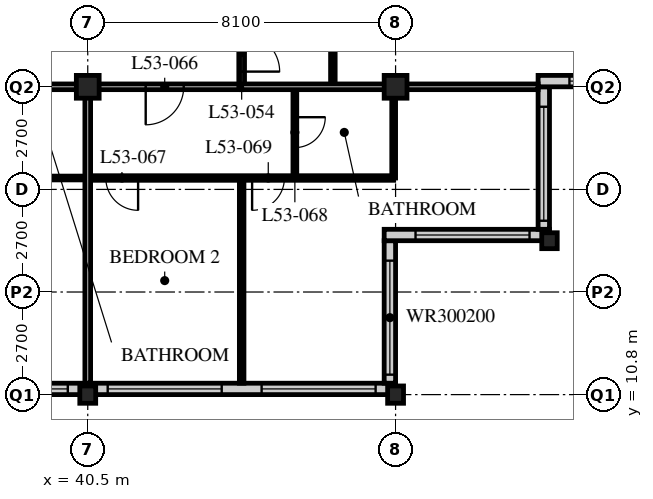
"""IFC4 building model, lengths in metres.
Left out: names, types, materials, properties, quantities, classifications, styles, units other than length and angle.
Written with IfcOpenShell. Run it as: python <this file> out.ifc"""

import sys

from ifc_helpers import new_model, si_unit, direction, frame, frame_2d, origin, origin_2d, place, context, subcontext, project, spatial, rectangle, hollow_rectangle, i_section, extrude, element, fill, save


model = new_model("IFC4")
c1 = context("Model", 3, precision=1e-05, world=origin(), true_north=direction((0.0, 1.0)))
c2 = subcontext(c1, "Body", "Model", "MODEL_VIEW")
j1 = project(units=[si_unit("LENGTHUNIT", "METRE"), si_unit("PLANEANGLEUNIT", "RADIAN")], contexts=[c1])
p1 = place(None, origin())
s1 = spatial("IfcSite", under=j1, at=p1, CompositionType="ELEMENT")
p2 = place(p1, origin())
s2 = spatial("IfcBuilding", under=s1, at=p2, CompositionType="ELEMENT")
p3 = place(p2, frame((0.0, 0.0, 206.4)))
s3 = spatial("IfcBuildingStorey", under=s2, at=p3, CompositionType="ELEMENT", Elevation=206.4)
p4 = place(p3, frame((40.5, 10.8, 0.0), z_axis=(0.0, 0.0, 1.0), x_axis=(1.0, 0.0, 0.0)))
e1 = element("IfcColumn", 1, at=p4, inside=s3, PredefinedType="COLUMN", context=c2, shape_type="SweptSolid", body=[
    extrude(i_section(OverallWidth=0.418, OverallDepth=0.456, WebThickness=0.042, FlangeThickness=0.067, FilletRadius=0.015, at=origin_2d()), origin(), (0.0, 0.0, 1.0), 3.6),
])
p5 = place(p3, frame((40.5, 18.9, 0.0), z_axis=(0.0, 0.0, 1.0), x_axis=(1.0, 0.0, 0.0)))
e2 = element("IfcColumn", 2, at=p5, inside=s3, PredefinedType="COLUMN", context=c2, shape_type="SweptSolid", body=[
    extrude(hollow_rectangle(XDim=0.6, YDim=0.6, WallThickness=0.05, at=origin_2d()), origin(), (0.0, 0.0, 1.0), 3.6),
])
p6 = place(p3, frame((48.6, 10.8, 0.0), z_axis=(0.0, 0.0, 1.0), x_axis=(1.0, 0.0, 0.0)))
e3 = element("IfcColumn", 3, at=p6, inside=s3, PredefinedType="COLUMN", context=c2, shape_type="SweptSolid", body=[
    extrude(i_section(OverallWidth=0.418, OverallDepth=0.456, WebThickness=0.042, FlangeThickness=0.067, FilletRadius=0.015, at=origin_2d()), origin(), (0.0, 0.0, 1.0), 3.6),
])
p7 = place(p3, frame((48.6, 18.9, 0.0), z_axis=(0.0, 0.0, 1.0), x_axis=(1.0, 0.0, 0.0)))
e4 = element("IfcColumn", 4, at=p7, inside=s3, PredefinedType="COLUMN", context=c2, shape_type="SweptSolid", body=[
    extrude(hollow_rectangle(XDim=0.6, YDim=0.6, WallThickness=0.05, at=origin_2d()), origin(), (0.0, 0.0, 1.0), 3.6),
])
p8 = place(p3, frame((52.65, 14.85, 0.0), z_axis=(0.0, 0.0, 1.0), x_axis=(1.0, 0.0, 0.0)))
e5 = element("IfcColumn", 5, at=p8, inside=s3, PredefinedType="COLUMN", context=c2, shape_type="SweptSolid", body=[
    extrude(i_section(OverallWidth=0.407, OverallDepth=0.419, WebThickness=0.031, FlangeThickness=0.049, FilletRadius=0.015, at=origin_2d()), origin(), (0.0, 0.0, 1.0), 3.6),
])
p9 = place(p3, frame((8.4, 10.95, 0.0), z_axis=(0.0, 0.0, 1.0), x_axis=(1.0, 0.0, 0.0)))
e6 = element("IfcWall", 6, at=p9, inside=s3, PredefinedType="SOLIDWALL", context=c2, shape_type="SweptSolid", body=[
    extrude(rectangle(XDim=40.2, YDim=0.3, at=frame_2d((20.1, 0.0))), origin(), (0.0, 0.0, 1.0), 3.39),
])
p10 = place(p9, frame((0.225, 0.0, 0.6)))
e7 = element("IfcOpeningElement", 7, at=p10, cuts=e6, PredefinedType="OPENING", context=c2, shape_type="SweptSolid", body=[
    extrude(rectangle(XDim=3.0, YDim=2.4, at=frame_2d((1.5, 1.2))), frame((0.0, 0.16, 0.0), z_axis=(0.0, -1.0, 0.0), x_axis=(1.0, 0.0, 0.0)), (0.0, 0.0, 1.0), 0.32),
])
p11 = place(p9, frame((4.275, 0.0, 0.6)))
e8 = element("IfcOpeningElement", 8, at=p11, cuts=e6, PredefinedType="OPENING", context=c2, shape_type="SweptSolid", body=[
    extrude(rectangle(XDim=3.0, YDim=2.4, at=frame_2d((1.5, 1.2))), frame((0.0, 0.16, 0.0), z_axis=(0.0, -1.0, 0.0), x_axis=(1.0, 0.0, 0.0)), (0.0, 0.0, 1.0), 0.32),
])
p12 = place(p9, frame((8.325, 0.0, 0.6)))
e9 = element("IfcOpeningElement", 9, at=p12, cuts=e6, PredefinedType="OPENING", context=c2, shape_type="SweptSolid", body=[
    extrude(rectangle(XDim=3.0, YDim=2.4, at=frame_2d((1.5, 1.2))), frame((0.0, 0.16, 0.0), z_axis=(0.0, -1.0, 0.0), x_axis=(1.0, 0.0, 0.0)), (0.0, 0.0, 1.0), 0.32),
])
p13 = place(p9, frame((12.375, 0.0, 0.6)))
e10 = element("IfcOpeningElement", 10, at=p13, cuts=e6, PredefinedType="OPENING", context=c2, shape_type="SweptSolid", body=[
    extrude(rectangle(XDim=3.0, YDim=2.4, at=frame_2d((1.5, 1.2))), frame((0.0, 0.16, 0.0), z_axis=(0.0, -1.0, 0.0), x_axis=(1.0, 0.0, 0.0)), (0.0, 0.0, 1.0), 0.32),
])
p14 = place(p9, frame((16.425, 0.0, 0.6)))
e11 = element("IfcOpeningElement", 11, at=p14, cuts=e6, PredefinedType="OPENING", context=c2, shape_type="SweptSolid", body=[
    extrude(rectangle(XDim=3.0, YDim=2.4, at=frame_2d((1.5, 1.2))), frame((0.0, 0.16, 0.0), z_axis=(0.0, -1.0, 0.0), x_axis=(1.0, 0.0, 0.0)), (0.0, 0.0, 1.0), 0.32),
])
p15 = place(p9, frame((20.475, 0.0, 0.6)))
e12 = element("IfcOpeningElement", 12, at=p15, cuts=e6, PredefinedType="OPENING", context=c2, shape_type="SweptSolid", body=[
    extrude(rectangle(XDim=3.0, YDim=2.4, at=frame_2d((1.5, 1.2))), frame((0.0, 0.16, 0.0), z_axis=(0.0, -1.0, 0.0), x_axis=(1.0, 0.0, 0.0)), (0.0, 0.0, 1.0), 0.32),
])
p16 = place(p9, frame((24.525, 0.0, 0.6)))
e13 = element("IfcOpeningElement", 13, at=p16, cuts=e6, PredefinedType="OPENING", context=c2, shape_type="SweptSolid", body=[
    extrude(rectangle(XDim=3.0, YDim=2.4, at=frame_2d((1.5, 1.2))), frame((0.0, 0.16, 0.0), z_axis=(0.0, -1.0, 0.0), x_axis=(1.0, 0.0, 0.0)), (0.0, 0.0, 1.0), 0.32),
])
p17 = place(p9, frame((28.575, 0.0, 0.6)))
e14 = element("IfcOpeningElement", 14, at=p17, cuts=e6, PredefinedType="OPENING", context=c2, shape_type="SweptSolid", body=[
    extrude(rectangle(XDim=3.0, YDim=2.4, at=frame_2d((1.5, 1.2))), frame((0.0, 0.16, 0.0), z_axis=(0.0, -1.0, 0.0), x_axis=(1.0, 0.0, 0.0)), (0.0, 0.0, 1.0), 0.32),
])
p18 = place(p9, frame((32.625, 0.0, 0.6)))
e15 = element("IfcOpeningElement", 15, at=p18, cuts=e6, PredefinedType="OPENING", context=c2, shape_type="SweptSolid", body=[
    extrude(rectangle(XDim=3.0, YDim=2.4, at=frame_2d((1.5, 1.2))), frame((0.0, 0.16, 0.0), z_axis=(0.0, -1.0, 0.0), x_axis=(1.0, 0.0, 0.0)), (0.0, 0.0, 1.0), 0.32),
])
p19 = place(p9, frame((36.675, 0.0, 0.6)))
e16 = element("IfcOpeningElement", 16, at=p19, cuts=e6, PredefinedType="OPENING", context=c2, shape_type="SweptSolid", body=[
    extrude(rectangle(XDim=3.0, YDim=2.4, at=frame_2d((1.5, 1.2))), frame((0.0, 0.16, 0.0), z_axis=(0.0, -1.0, 0.0), x_axis=(1.0, 0.0, 0.0)), (0.0, 0.0, 1.0), 0.32),
])
p20 = place(p3, frame((48.45, 11.1, 0.0), z_axis=(0.0, 0.0, 1.0), x_axis=(0.0, 1.0, 0.0)))
e17 = element("IfcWall", 17, at=p20, inside=s3, PredefinedType="SOLIDWALL", context=c2, shape_type="SweptSolid", body=[
    extrude(rectangle(XDim=3.75, YDim=0.3, at=frame_2d((1.875, 0.0))), origin(), (0.0, 0.0, 1.0), 3.39),
])
p21 = place(p20, frame((0.225, 0.0, 0.6)))
e18 = element("IfcOpeningElement", 18, at=p21, cuts=e17, PredefinedType="OPENING", context=c2, shape_type="SweptSolid", body=[
    extrude(rectangle(XDim=3.0, YDim=2.0, at=frame_2d((1.5, 1.0))), frame((0.0, 0.16, 0.0), z_axis=(0.0, -1.0, 0.0), x_axis=(1.0, 0.0, 0.0)), (0.0, 0.0, 1.0), 0.32),
])
p22 = place(p3, frame((48.3, 15.0, 0.0), z_axis=(0.0, 0.0, 1.0), x_axis=(1.0, 0.0, 0.0)))
e19 = element("IfcWall", 19, at=p22, inside=s3, PredefinedType="SOLIDWALL", context=c2, shape_type="SweptSolid", body=[
    extrude(rectangle(XDim=4.35, YDim=0.3, at=frame_2d((2.175, 0.0))), origin(), (0.0, 0.0, 1.0), 3.39),
])
p23 = place(p22, frame((0.825, 0.0, 0.6)))
e20 = element("IfcOpeningElement", 20, at=p23, cuts=e19, PredefinedType="OPENING", context=c2, shape_type="SweptSolid", body=[
    extrude(rectangle(XDim=3.0, YDim=2.0, at=frame_2d((1.5, 1.0))), frame((0.0, 0.16, 0.0), z_axis=(0.0, -1.0, 0.0), x_axis=(1.0, 0.0, 0.0)), (0.0, 0.0, 1.0), 0.32),
])
p24 = place(p3, frame((52.5, 15.15, 0.0), z_axis=(0.0, 0.0, 1.0), x_axis=(0.0, 1.0, 0.0)))
e21 = element("IfcWall", 21, at=p24, inside=s3, PredefinedType="SOLIDWALL", context=c2, shape_type="SweptSolid", body=[
    extrude(rectangle(XDim=3.75, YDim=0.3, at=frame_2d((1.875, 0.0))), origin(), (0.0, 0.0, 1.0), 3.39),
])
p25 = place(p24, frame((0.225, 0.0, 0.6)))
e22 = element("IfcOpeningElement", 22, at=p25, cuts=e21, PredefinedType="OPENING", context=c2, shape_type="SweptSolid", body=[
    extrude(rectangle(XDim=3.0, YDim=2.0, at=frame_2d((1.5, 1.0))), frame((0.0, 0.16, 0.0), z_axis=(0.0, -1.0, 0.0), x_axis=(1.0, 0.0, 0.0)), (0.0, 0.0, 1.0), 0.32),
])
p26 = place(p3, frame((52.35, 19.05, 0.0), z_axis=(0.0, 0.0, 1.0), x_axis=(1.0, 0.0, 0.0)))
e23 = element("IfcWall", 23, at=p26, inside=s3, PredefinedType="SOLIDWALL", context=c2, shape_type="SweptSolid", body=[
    extrude(rectangle(XDim=4.35, YDim=0.3, at=frame_2d((2.175, 0.0))), origin(), (0.0, 0.0, 1.0), 3.39),
])
p27 = place(p26, frame((0.825, 0.0, 0.6)))
e24 = element("IfcOpeningElement", 24, at=p27, cuts=e23, PredefinedType="OPENING", context=c2, shape_type="SweptSolid", body=[
    extrude(rectangle(XDim=3.0, YDim=2.0, at=frame_2d((1.5, 1.0))), frame((0.0, 0.16, 0.0), z_axis=(0.0, -1.0, 0.0), x_axis=(1.0, 0.0, 0.0)), (0.0, 0.0, 1.0), 0.32),
])
p28 = place(p3, frame((8.1, 18.9, 0.0), z_axis=(0.0, 0.0, 1.0), x_axis=(1.0, 0.0, 0.0)))
e25 = element("IfcWall", 25, at=p28, inside=s3, PredefinedType="PARTITIONING", context=c2, shape_type="SweptSolid", body=[
    extrude(rectangle(XDim=36.45, YDim=0.15, at=frame_2d((18.225, 0.0))), origin(), (0.0, 0.0, 1.0), 2.778),
])
p29 = place(p28, frame((4.45, 0.0, 0.0)))
e26 = element("IfcOpeningElement", 26, at=p29, cuts=e25, PredefinedType="OPENING", context=c2, shape_type="SweptSolid", body=[
    extrude(rectangle(XDim=1.0, YDim=2.1, at=frame_2d((0.5, 1.05))), frame((0.0, 0.085, 0.0), z_axis=(0.0, -1.0, 0.0), x_axis=(1.0, 0.0, 0.0)), (0.0, 0.0, 1.0), 0.17),
])
p30 = place(p28, frame((12.55, 0.0, 0.0)))
e27 = element("IfcOpeningElement", 27, at=p30, cuts=e25, PredefinedType="OPENING", context=c2, shape_type="SweptSolid", body=[
    extrude(rectangle(XDim=1.0, YDim=2.1, at=frame_2d((0.5, 1.05))), frame((0.0, 0.085, 0.0), z_axis=(0.0, -1.0, 0.0), x_axis=(1.0, 0.0, 0.0)), (0.0, 0.0, 1.0), 0.17),
])
p31 = place(p28, frame((29.05, 0.0, 0.0)))
e28 = element("IfcOpeningElement", 28, at=p31, cuts=e25, PredefinedType="OPENING", context=c2, shape_type="SweptSolid", body=[
    extrude(rectangle(XDim=1.0, YDim=2.1, at=frame_2d((0.5, 1.05))), frame((0.0, 0.085, 0.0), z_axis=(0.0, -1.0, 0.0), x_axis=(1.0, 0.0, 0.0)), (0.0, 0.0, 1.0), 0.17),
])
p32 = place(p28, frame((2.625, 0.0, 0.0)))
e29 = element("IfcOpeningElement", 29, at=p32, cuts=e25, PredefinedType="OPENING", context=c2, shape_type="SweptSolid", body=[
    extrude(rectangle(XDim=1.0, YDim=2.1, at=frame_2d((0.5, 1.05))), frame((0.0, 0.085, 0.0), z_axis=(0.0, -1.0, 0.0), x_axis=(1.0, 0.0, 0.0)), (0.0, 0.0, 1.0), 0.17),
])
p33 = place(p28, frame((33.925, 0.0, 0.0)))
e30 = element("IfcOpeningElement", 30, at=p33, cuts=e25, PredefinedType="OPENING", context=c2, shape_type="SweptSolid", body=[
    extrude(rectangle(XDim=1.0, YDim=2.1, at=frame_2d((0.5, 1.05))), frame((0.0, 0.085, 0.0), z_axis=(0.0, -1.0, 0.0), x_axis=(1.0, 0.0, 0.0)), (0.0, 0.0, 1.0), 0.17),
])
p34 = place(p3, frame((44.55, 18.9, 0.0), z_axis=(0.0, 0.0, 1.0), x_axis=(0.0, 1.0, 0.0)))
e31 = element("IfcWall", 31, at=p34, inside=s3, PredefinedType="PARTITIONING", context=c2, shape_type="SweptSolid", body=[
    extrude(rectangle(XDim=28.35, YDim=0.15, at=frame_2d((14.175, 0.0))), origin(), (0.0, 0.0, 1.0), 3.39),
])
p35 = place(p34, frame((0.4, 0.0, 0.0)))
e32 = element("IfcOpeningElement", 32, at=p35, cuts=e31, PredefinedType="OPENING", context=c2, shape_type="SweptSolid", body=[
    extrude(rectangle(XDim=1.0, YDim=2.1, at=frame_2d((0.5, 1.05))), frame((0.0, 0.085, 0.0), z_axis=(0.0, -1.0, 0.0), x_axis=(1.0, 0.0, 0.0)), (0.0, 0.0, 1.0), 0.17),
])
p36 = place(p34, frame((12.55, 0.0, 0.0)))
e33 = element("IfcOpeningElement", 33, at=p36, cuts=e31, PredefinedType="OPENING", context=c2, shape_type="SweptSolid", body=[
    extrude(rectangle(XDim=1.0, YDim=2.1, at=frame_2d((0.5, 1.05))), frame((0.0, 0.085, 0.0), z_axis=(0.0, -1.0, 0.0), x_axis=(1.0, 0.0, 0.0)), (0.0, 0.0, 1.0), 0.17),
])
p37 = place(p34, frame((26.65, 0.0, 0.0)))
e34 = element("IfcOpeningElement", 34, at=p37, cuts=e31, PredefinedType="OPENING", context=c2, shape_type="SweptSolid", body=[
    extrude(rectangle(XDim=1.0, YDim=2.1, at=frame_2d((0.5, 1.05))), frame((0.0, 0.085, 0.0), z_axis=(0.0, -1.0, 0.0), x_axis=(1.0, 0.0, 0.0)), (0.0, 0.0, 1.0), 0.17),
])
p38 = place(p3, frame((38.3, 16.5, 0.0), z_axis=(0.0, 0.0, 1.0), x_axis=(1.0, 0.0, 0.0)))
e35 = element("IfcWall", 35, at=p38, inside=s3, PredefinedType="PARTITIONING", context=c2, shape_type="SweptSolid", body=[
    extrude(rectangle(XDim=2.2, YDim=0.1, at=frame_2d((1.1, 0.0))), origin(), (0.0, 0.0, 1.0), 3.39),
])
p39 = place(p3, frame((46.95, 18.9, 0.0), z_axis=(0.0, 0.0, 1.0), x_axis=(0.0, 1.0, 0.0)))
e36 = element("IfcWall", 36, at=p39, inside=s3, PredefinedType="PARTITIONING", context=c2, shape_type="SweptSolid", body=[
    extrude(rectangle(XDim=24.3, YDim=0.12, at=frame_2d((12.15, 0.0))), origin(), (0.0, 0.0, 1.0), 3.39),
])
p40 = place(p39, frame((0.975, 0.0, 0.0)))
e37 = element("IfcOpeningElement", 37, at=p40, cuts=e36, PredefinedType="OPENING", context=c2, shape_type="SweptSolid", body=[
    extrude(rectangle(XDim=0.85, YDim=2.1, at=frame_2d((0.425, 1.05))), frame((0.0, 0.07, 0.0), z_axis=(0.0, -1.0, 0.0), x_axis=(1.0, 0.0, 0.0)), (0.0, 0.0, 1.0), 0.14),
])
p41 = place(p39, frame((8.425, 0.0, 0.0)))
e38 = element("IfcOpeningElement", 38, at=p41, cuts=e36, PredefinedType="OPENING", context=c2, shape_type="SweptSolid", body=[
    extrude(rectangle(XDim=0.85, YDim=2.1, at=frame_2d((0.425, 1.05))), frame((0.0, 0.07, 0.0), z_axis=(0.0, -1.0, 0.0), x_axis=(1.0, 0.0, 0.0)), (0.0, 0.0, 1.0), 0.14),
])
p42 = place(p39, frame((13.125, 0.0, 0.0)))
e39 = element("IfcOpeningElement", 39, at=p42, cuts=e36, PredefinedType="OPENING", context=c2, shape_type="SweptSolid", body=[
    extrude(rectangle(XDim=0.85, YDim=2.1, at=frame_2d((0.425, 1.05))), frame((0.0, 0.07, 0.0), z_axis=(0.0, -1.0, 0.0), x_axis=(1.0, 0.0, 0.0)), (0.0, 0.0, 1.0), 0.14),
])
p43 = place(p39, frame((20.575, 0.0, 0.0)))
e40 = element("IfcOpeningElement", 40, at=p43, cuts=e36, PredefinedType="OPENING", context=c2, shape_type="SweptSolid", body=[
    extrude(rectangle(XDim=0.85, YDim=2.1, at=frame_2d((0.425, 1.05))), frame((0.0, 0.07, 0.0), z_axis=(0.0, -1.0, 0.0), x_axis=(1.0, 0.0, 0.0)), (0.0, 0.0, 1.0), 0.14),
])
p44 = place(p3, frame((40.5, 16.5, 0.0), z_axis=(0.0, 0.0, 1.0), x_axis=(1.0, 0.0, 0.0)))
e41 = element("IfcWall", 41, at=p44, inside=s3, PredefinedType="PARTITIONING", context=c2, shape_type="SweptSolid", body=[
    extrude(rectangle(XDim=8.05, YDim=0.12, at=frame_2d((4.025, 0.0))), origin(), (0.0, 0.0, 1.0), 3.39),
])
p45 = place(p44, frame((0.475, 0.0, 0.0)))
e42 = element("IfcOpeningElement", 42, at=p45, cuts=e41, PredefinedType="OPENING", context=c2, shape_type="SweptSolid", body=[
    extrude(rectangle(XDim=0.85, YDim=2.1, at=frame_2d((0.425, 1.05))), frame((0.0, 0.07, 0.0), z_axis=(0.0, -1.0, 0.0), x_axis=(1.0, 0.0, 0.0)), (0.0, 0.0, 1.0), 0.14),
])
p46 = place(p44, frame((4.325, 0.0, 0.0)))
e43 = element("IfcOpeningElement", 43, at=p46, cuts=e41, PredefinedType="OPENING", context=c2, shape_type="SweptSolid", body=[
    extrude(rectangle(XDim=0.85, YDim=2.1, at=frame_2d((0.425, 1.05))), frame((0.0, 0.07, 0.0), z_axis=(0.0, -1.0, 0.0), x_axis=(1.0, 0.0, 0.0)), (0.0, 0.0, 1.0), 0.14),
])
p47 = place(p3, frame((45.95, 18.9, 0.0), z_axis=(0.0, 0.0, 1.0), x_axis=(0.0, -1.0, 0.0)))
e44 = element("IfcWall", 44, at=p47, inside=s3, PredefinedType="PARTITIONING", context=c2, shape_type="SweptSolid", body=[
    extrude(rectangle(XDim=2.4, YDim=0.1, at=frame_2d((1.2, 0.0))), origin(), (0.0, 0.0, 1.0), 3.39),
])
p48 = place(p47, frame((0.8, 0.0, 0.0)))
e45 = element("IfcOpeningElement", 45, at=p48, cuts=e44, PredefinedType="OPENING", context=c2, shape_type="SweptSolid", body=[
    extrude(rectangle(XDim=0.8, YDim=2.1, at=frame_2d((0.4, 1.05))), frame((0.0, 0.06, 0.0), z_axis=(0.0, -1.0, 0.0), x_axis=(1.0, 0.0, 0.0)), (0.0, 0.0, 1.0), 0.12),
])
p49 = place(p3, frame((48.55, 18.9, 0.0), z_axis=(0.0, 0.0, 1.0), x_axis=(0.0, -1.0, 0.0)))
e46 = element("IfcWall", 46, at=p49, inside=s3, PredefinedType="PARTITIONING", context=c2, shape_type="SweptSolid", body=[
    extrude(rectangle(XDim=2.4, YDim=0.1, at=frame_2d((1.2, 0.0))), origin(), (0.0, 0.0, 1.0), 2.778),
])
p50 = place(p3, frame((44.55, 16.5, 0.0), z_axis=(0.0, 0.0, 1.0), x_axis=(0.0, -1.0, 0.0)))
e47 = element("IfcWall", 47, at=p50, inside=s3, PredefinedType="PARTITIONING", context=c2, shape_type="SweptSolid", body=[
    extrude(rectangle(XDim=5.4, YDim=0.12, at=frame_2d((2.7, 0.0))), origin(), (0.0, 0.0, 1.0), 3.39),
])
p51 = place(p3, frame((44.55, 18.9, 0.0), z_axis=(0.0, 0.0, 1.0), x_axis=(1.0, 0.0, 0.0)))
e48 = element("IfcWall", 48, at=p51, inside=s3, PredefinedType="PARTITIONING", context=c2, shape_type="SweptSolid", body=[
    extrude(rectangle(XDim=7.8, YDim=0.15, at=frame_2d((3.9, 0.0))), origin(), (0.0, 0.0, 1.0), 2.778),
])
p52 = place(p3, frame((40.5, 18.9, 0.0), z_axis=(0.0, 0.0, 1.0), x_axis=(0.0, -1.0, 0.0)))
e49 = element("IfcWall", 49, at=p52, inside=s3, PredefinedType="PARTITIONING", context=c2, shape_type="SweptSolid", body=[
    extrude(rectangle(XDim=7.8, YDim=0.15, at=frame_2d((3.9, 0.0))), origin(), (0.0, 0.0, 1.0), 2.778),
])
p53 = place(p17, origin())
e50 = element("IfcWindow", 50, at=p53, inside=s3, PartitioningType="SINGLE_PANEL", PredefinedType="WINDOW", context=c2, shape_type="SweptSolid", body=[
    extrude(rectangle(XDim=3.0, YDim=2.4, at=frame_2d((1.5, 1.2))), frame((0.0, 0.03, 0.0), z_axis=(0.0, -1.0, 0.0), x_axis=(1.0, 0.0, 0.0)), (0.0, 0.0, 1.0), 0.06),
])
fill(e14, e50)
p54 = place(p18, origin())
e51 = element("IfcWindow", 51, at=p54, inside=s3, PartitioningType="SINGLE_PANEL", PredefinedType="WINDOW", context=c2, shape_type="SweptSolid", body=[
    extrude(rectangle(XDim=3.0, YDim=2.4, at=frame_2d((1.5, 1.2))), frame((0.0, 0.03, 0.0), z_axis=(0.0, -1.0, 0.0), x_axis=(1.0, 0.0, 0.0)), (0.0, 0.0, 1.0), 0.06),
])
fill(e15, e51)
p55 = place(p19, origin())
e52 = element("IfcWindow", 52, at=p55, inside=s3, PartitioningType="SINGLE_PANEL", PredefinedType="WINDOW", context=c2, shape_type="SweptSolid", body=[
    extrude(rectangle(XDim=3.0, YDim=2.4, at=frame_2d((1.5, 1.2))), frame((0.0, 0.03, 0.0), z_axis=(0.0, -1.0, 0.0), x_axis=(1.0, 0.0, 0.0)), (0.0, 0.0, 1.0), 0.06),
])
fill(e16, e52)
p56 = place(p21, origin())
e53 = element("IfcWindow", 53, at=p56, inside=s3, PartitioningType="SINGLE_PANEL", PredefinedType="WINDOW", context=c2, shape_type="SweptSolid", body=[
    extrude(rectangle(XDim=3.0, YDim=2.0, at=frame_2d((1.5, 1.0))), frame((0.0, 0.03, 0.0), z_axis=(0.0, -1.0, 0.0), x_axis=(1.0, 0.0, 0.0)), (0.0, 0.0, 1.0), 0.06),
])
fill(e18, e53)
p57 = place(p23, origin())
e54 = element("IfcWindow", 54, at=p57, inside=s3, PartitioningType="SINGLE_PANEL", PredefinedType="WINDOW", context=c2, shape_type="SweptSolid", body=[
    extrude(rectangle(XDim=3.0, YDim=2.0, at=frame_2d((1.5, 1.0))), frame((0.0, 0.03, 0.0), z_axis=(0.0, -1.0, 0.0), x_axis=(1.0, 0.0, 0.0)), (0.0, 0.0, 1.0), 0.06),
])
fill(e20, e54)
p58 = place(p25, origin())
e55 = element("IfcWindow", 55, at=p58, inside=s3, PartitioningType="SINGLE_PANEL", PredefinedType="WINDOW", context=c2, shape_type="SweptSolid", body=[
    extrude(rectangle(XDim=3.0, YDim=2.0, at=frame_2d((1.5, 1.0))), frame((0.0, 0.03, 0.0), z_axis=(0.0, -1.0, 0.0), x_axis=(1.0, 0.0, 0.0)), (0.0, 0.0, 1.0), 0.06),
])
fill(e22, e55)
p59 = place(p27, origin())
e56 = element("IfcWindow", 56, at=p59, inside=s3, PartitioningType="SINGLE_PANEL", PredefinedType="WINDOW", context=c2, shape_type="SweptSolid", body=[
    extrude(rectangle(XDim=3.0, YDim=2.0, at=frame_2d((1.5, 1.0))), frame((0.0, 0.03, 0.0), z_axis=(0.0, -1.0, 0.0), x_axis=(1.0, 0.0, 0.0)), (0.0, 0.0, 1.0), 0.06),
])
fill(e24, e56)
p60 = place(p35, origin())
e57 = element("IfcDoor", 57, at=p60, inside=s3, OperationType="SINGLE_SWING_RIGHT", PredefinedType="DOOR", context=c2, shape_type="SweptSolid", body=[
    extrude(rectangle(XDim=1.0, YDim=2.1, at=frame_2d((0.5, 1.05))), frame((0.0, 0.025, 0.0), z_axis=(0.0, -1.0, 0.0), x_axis=(1.0, 0.0, 0.0)), (0.0, 0.0, 1.0), 0.05),
])
fill(e32, e57)
p61 = place(p33, origin())
e58 = element("IfcDoor", 58, at=p61, inside=s3, OperationType="SINGLE_SWING_RIGHT", PredefinedType="DOOR", context=c2, shape_type="SweptSolid", body=[
    extrude(rectangle(XDim=1.0, YDim=2.1, at=frame_2d((0.5, 1.05))), frame((0.0, 0.025, 0.0), z_axis=(0.0, -1.0, 0.0), x_axis=(1.0, 0.0, 0.0)), (0.0, 0.0, 1.0), 0.05),
])
fill(e30, e58)
p62 = place(p45, origin())
e59 = element("IfcDoor", 59, at=p62, inside=s3, OperationType="SINGLE_SWING_LEFT", PredefinedType="DOOR", context=c2, shape_type="SweptSolid", body=[
    extrude(rectangle(XDim=0.85, YDim=2.1, at=frame_2d((0.425, 1.05))), frame((0.0, 0.025, 0.0), z_axis=(0.0, -1.0, 0.0), x_axis=(1.0, 0.0, 0.0)), (0.0, 0.0, 1.0), 0.05),
])
fill(e42, e59)
p63 = place(p48, origin())
e60 = element("IfcDoor", 60, at=p63, inside=s3, OperationType="SINGLE_SWING_LEFT", PredefinedType="DOOR", context=c2, shape_type="SweptSolid", body=[
    extrude(rectangle(XDim=0.8, YDim=2.1, at=frame_2d((0.4, 1.05))), frame((0.0, 0.025, 0.0), z_axis=(0.0, -1.0, 0.0), x_axis=(1.0, 0.0, 0.0)), (0.0, 0.0, 1.0), 0.05),
])
fill(e45, e60)
p64 = place(p46, origin())
e61 = element("IfcDoor", 61, at=p64, inside=s3, OperationType="SINGLE_SWING_RIGHT", PredefinedType="DOOR", context=c2, shape_type="SweptSolid", body=[
    extrude(rectangle(XDim=0.85, YDim=2.1, at=frame_2d((0.425, 1.05))), frame((0.0, 0.025, 0.0), z_axis=(0.0, -1.0, 0.0), x_axis=(1.0, 0.0, 0.0)), (0.0, 0.0, 1.0), 0.05),
])
fill(e43, e61)
save(model, sys.argv[1])
